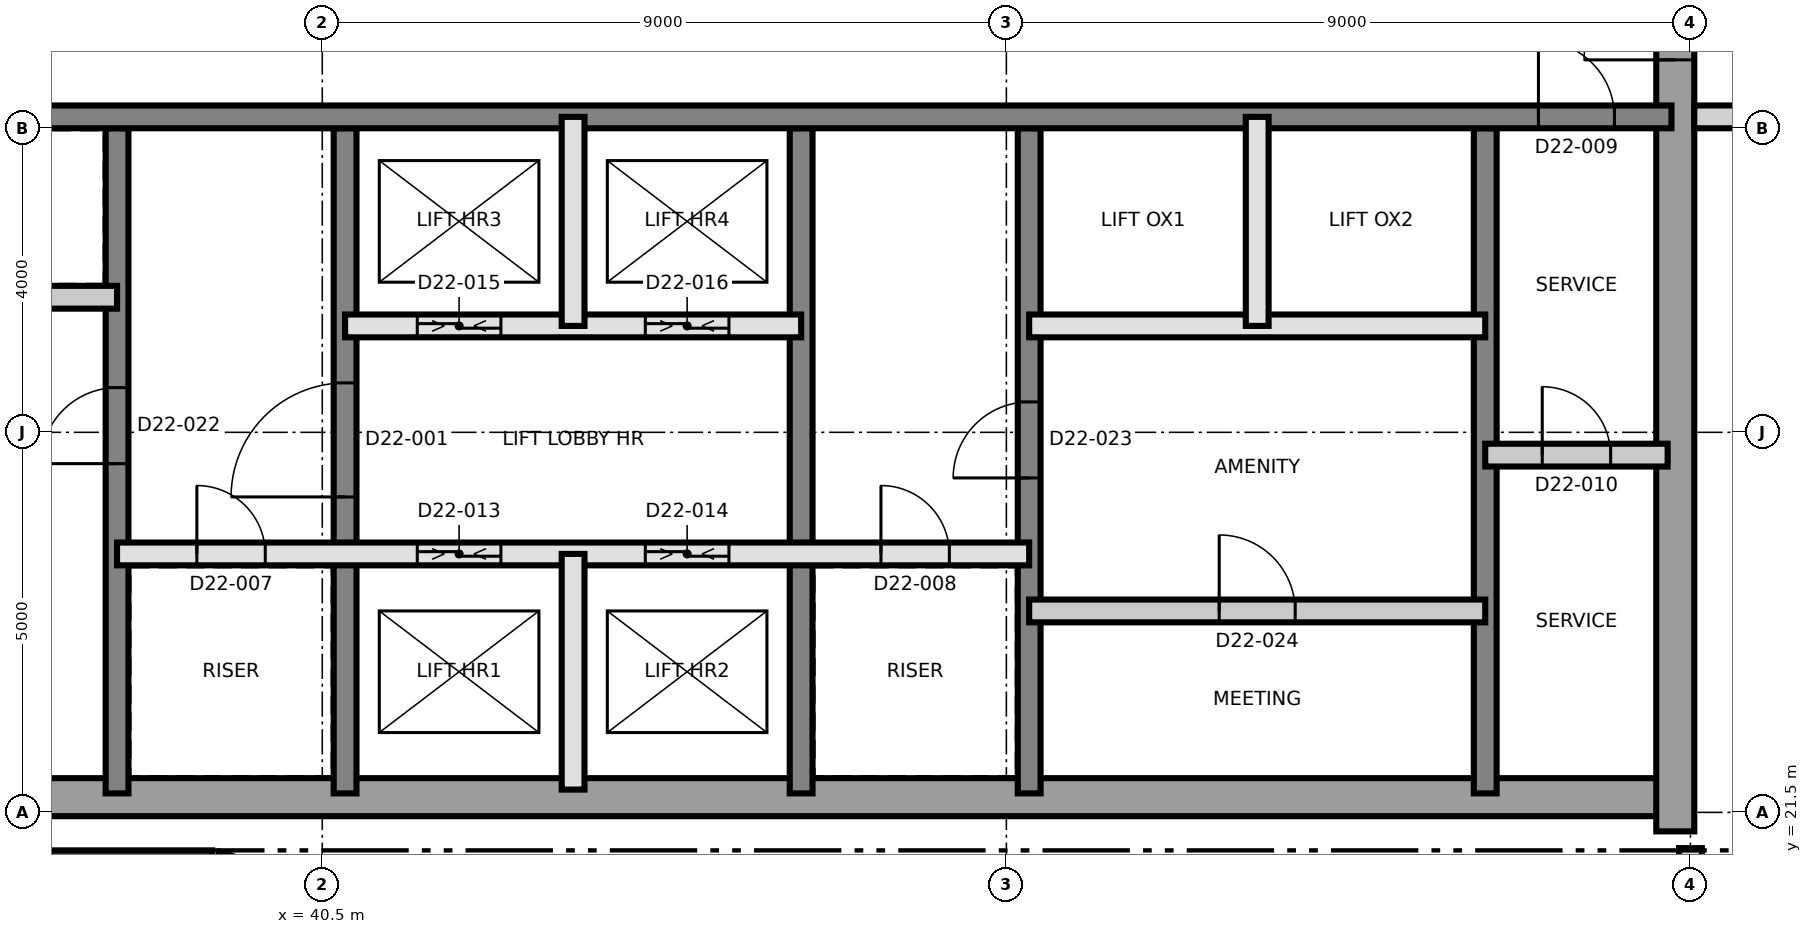
"""IFC4 building model, lengths in metres.
Left out: names, types, materials, properties, quantities, classifications, styles, units other than length and angle.
Written with IfcOpenShell. Run it as: python <this file> out.ifc"""

import sys

from ifc_helpers import new_model, si_unit, direction, frame, frame_2d, origin, place, context, subcontext, project, spatial, rectangle, extrude, element, fill, save


model = new_model("IFC4")
c1 = context("Model", 3, precision=1e-05, world=origin(), true_north=direction((0.0, 1.0)))
c2 = subcontext(c1, "Body", "Model", "MODEL_VIEW")
j1 = project(units=[si_unit("LENGTHUNIT", "METRE"), si_unit("PLANEANGLEUNIT", "RADIAN")], contexts=[c1])
p1 = place(None, origin())
s1 = spatial("IfcSite", under=j1, at=p1, CompositionType="ELEMENT")
p2 = place(p1, origin())
s2 = spatial("IfcBuilding", under=s1, at=p2, CompositionType="ELEMENT")
p3 = place(p2, frame((0.0, 0.0, 203.2)))
s3 = spatial("IfcBuildingStorey", under=s2, at=p3, CompositionType="ELEMENT", Elevation=203.2)
p4 = place(p3, frame((31.25, 21.7, 0.0), z_axis=(0.0, 0.0, 1.0), x_axis=(1.0, 0.0, 0.0)))
e1 = element("IfcWall", 1, at=p4, inside=s3, PredefinedType="SHEAR", context=c2, shape_type="SweptSolid", body=[
    extrude(rectangle(XDim=27.0, YDim=0.5, at=frame_2d((13.5, 0.0))), origin(), (0.0, 0.0, 1.0), 3.7),
])
p5 = place(p3, frame((58.3, 21.25, 0.0), z_axis=(0.0, 0.0, 1.0), x_axis=(0.0, 1.0, 0.0)))
e2 = element("IfcWall", 2, at=p5, inside=s3, PredefinedType="SHEAR", context=c2, shape_type="SweptSolid", body=[
    extrude(rectangle(XDim=18.5, YDim=0.5, at=frame_2d((9.25, 0.0))), origin(), (0.0, 0.0, 1.0), 3.7),
])
p6 = place(p5, frame((10.15, 0.0, 0.0)))
e3 = element("IfcOpeningElement", 3, at=p6, cuts=e2, PredefinedType="OPENING", context=c2, shape_type="SweptSolid", body=[
    extrude(rectangle(XDim=1.2, YDim=2.1, at=frame_2d((0.6, 1.05))), frame((0.0, 0.26, 0.0), z_axis=(0.0, -1.0, 0.0), x_axis=(1.0, 0.0, 0.0)), (0.0, 0.0, 1.0), 0.52),
])
p7 = place(p3, frame((37.8, 21.75, 0.0), z_axis=(0.0, 0.0, 1.0), x_axis=(0.0, 1.0, 0.0)))
e4 = element("IfcWall", 4, at=p7, inside=s3, PredefinedType="SHEAR", context=c2, shape_type="SweptSolid", body=[
    extrude(rectangle(XDim=8.75, YDim=0.3, at=frame_2d((4.375, 0.0))), origin(), (0.0, 0.0, 1.0), 3.7),
])
p8 = place(p7, frame((4.338, 0.0, 0.0)))
e5 = element("IfcOpeningElement", 5, at=p8, cuts=e4, PredefinedType="OPENING", context=c2, shape_type="SweptSolid", body=[
    extrude(rectangle(XDim=1.0, YDim=2.1, at=frame_2d((0.5, 1.05))), frame((0.0, 0.16, 0.0), z_axis=(0.0, -1.0, 0.0), x_axis=(1.0, 0.0, 0.0)), (0.0, 0.0, 1.0), 0.32),
])
p9 = place(p3, frame((40.8, 21.75, 0.0), z_axis=(0.0, 0.0, 1.0), x_axis=(0.0, 1.0, 0.0)))
e6 = element("IfcWall", 6, at=p9, inside=s3, PredefinedType="SHEAR", context=c2, shape_type="SweptSolid", body=[
    extrude(rectangle(XDim=8.75, YDim=0.3, at=frame_2d((4.375, 0.0))), origin(), (0.0, 0.0, 1.0), 3.7),
])
p10 = place(p9, frame((3.9, 0.0, 0.0)))
e7 = element("IfcOpeningElement", 7, at=p10, cuts=e6, PredefinedType="OPENING", context=c2, shape_type="SweptSolid", body=[
    extrude(rectangle(XDim=1.5, YDim=2.1, at=frame_2d((0.75, 1.05))), frame((0.0, 0.16, 0.0), z_axis=(0.0, -1.0, 0.0), x_axis=(1.0, 0.0, 0.0)), (0.0, 0.0, 1.0), 0.32),
])
p11 = place(p3, frame((46.8, 21.75, 0.0), z_axis=(0.0, 0.0, 1.0), x_axis=(0.0, 1.0, 0.0)))
e8 = element("IfcWall", 8, at=p11, inside=s3, PredefinedType="SHEAR", context=c2, shape_type="SweptSolid", body=[
    extrude(rectangle(XDim=8.75, YDim=0.3, at=frame_2d((4.375, 0.0))), origin(), (0.0, 0.0, 1.0), 3.7),
])
p12 = place(p3, frame((49.8, 21.75, 0.0), z_axis=(0.0, 0.0, 1.0), x_axis=(0.0, 1.0, 0.0)))
e9 = element("IfcWall", 9, at=p12, inside=s3, PredefinedType="SHEAR", context=c2, shape_type="SweptSolid", body=[
    extrude(rectangle(XDim=8.75, YDim=0.3, at=frame_2d((4.375, 0.0))), origin(), (0.0, 0.0, 1.0), 3.7),
])
p13 = place(p12, frame((4.15, 0.0, 0.0)))
e10 = element("IfcOpeningElement", 10, at=p13, cuts=e9, PredefinedType="OPENING", context=c2, shape_type="SweptSolid", body=[
    extrude(rectangle(XDim=1.0, YDim=2.1, at=frame_2d((0.5, 1.05))), frame((0.0, 0.16, 0.0), z_axis=(0.0, -1.0, 0.0), x_axis=(1.0, 0.0, 0.0)), (0.0, 0.0, 1.0), 0.32),
])
p14 = place(p3, frame((55.8, 21.75, 0.0), z_axis=(0.0, 0.0, 1.0), x_axis=(0.0, 1.0, 0.0)))
e11 = element("IfcWall", 11, at=p14, inside=s3, PredefinedType="SHEAR", context=c2, shape_type="SweptSolid", body=[
    extrude(rectangle(XDim=8.75, YDim=0.3, at=frame_2d((4.375, 0.0))), origin(), (0.0, 0.0, 1.0), 3.7),
])
p15 = place(p3, frame((31.75, 30.65, 0.0), z_axis=(0.0, 0.0, 1.0), x_axis=(1.0, 0.0, 0.0)))
e12 = element("IfcWall", 12, at=p15, inside=s3, PredefinedType="SHEAR", context=c2, shape_type="SweptSolid", body=[
    extrude(rectangle(XDim=26.5, YDim=0.3, at=frame_2d((13.25, 0.0))), origin(), (0.0, 0.0, 1.0), 3.7),
])
p16 = place(p15, frame((24.75, 0.0, 0.0)))
e13 = element("IfcOpeningElement", 13, at=p16, cuts=e12, PredefinedType="OPENING", context=c2, shape_type="SweptSolid", body=[
    extrude(rectangle(XDim=1.0, YDim=2.1, at=frame_2d((0.5, 1.05))), frame((0.0, 0.16, 0.0), z_axis=(0.0, -1.0, 0.0), x_axis=(1.0, 0.0, 0.0)), (0.0, 0.0, 1.0), 0.32),
])
p17 = place(p15, frame((4.05, 0.0, 0.0)))
e14 = element("IfcOpeningElement", 14, at=p17, cuts=e12, PredefinedType="OPENING", context=c2, shape_type="SweptSolid", body=[
    extrude(rectangle(XDim=1.0, YDim=2.1, at=frame_2d((0.5, 1.05))), frame((0.0, 0.16, 0.0), z_axis=(0.0, -1.0, 0.0), x_axis=(1.0, 0.0, 0.0)), (0.0, 0.0, 1.0), 0.32),
])
p18 = place(p3, frame((31.36, 20.85, 0.0), z_axis=(0.0, 0.0, 1.0), x_axis=(1.0, 0.0, 0.0)))
e15 = element("IfcWall", 15, at=p18, inside=s3, PredefinedType="SOLIDWALL", context=c2, shape_type="SweptSolid", body=[
    extrude(rectangle(XDim=7.693, YDim=0.3, at=frame_2d((3.846, 0.0))), origin(), (0.0, 0.0, 1.0), 3.4),
])
p19 = place(p3, frame((39.101, 20.842, 0.0), z_axis=(0.0, 0.0, 1.0), x_axis=(0.946930456305, -0.32143850255, 0.0)))
e16 = element("IfcWall", 16, at=p19, inside=s3, PredefinedType="SOLIDWALL", context=c2, shape_type="SweptSolid", body=[
    extrude(rectangle(XDim=1.32, YDim=0.3, at=frame_2d((0.66, 0.0))), origin(), (0.0, 0.0, 1.0), 3.4),
])
p20 = place(p3, frame((49.8, 24.15, 0.0), z_axis=(0.0, 0.0, 1.0), x_axis=(1.0, 0.0, 0.0)))
e17 = element("IfcWall", 17, at=p20, inside=s3, PredefinedType="PARTITIONING", context=c2, shape_type="SweptSolid", body=[
    extrude(rectangle(XDim=6.0, YDim=0.3, at=frame_2d((3.0, 0.0))), origin(), (0.0, 0.0, 1.0), 3.4),
])
p21 = place(p20, frame((2.5, 0.0, 0.0)))
e18 = element("IfcOpeningElement", 18, at=p21, cuts=e17, PredefinedType="OPENING", context=c2, shape_type="SweptSolid", body=[
    extrude(rectangle(XDim=1.0, YDim=2.1, at=frame_2d((0.5, 1.05))), frame((0.0, 0.16, 0.0), z_axis=(0.0, -1.0, 0.0), x_axis=(1.0, 0.0, 0.0)), (0.0, 0.0, 1.0), 0.32),
])
p22 = place(p3, frame((37.8, 24.9, 0.0), z_axis=(0.0, 0.0, 1.0), x_axis=(1.0, 0.0, 0.0)))
e19 = element("IfcWall", 19, at=p22, inside=s3, PredefinedType="SOLIDWALL", context=c2, shape_type="SweptSolid", body=[
    extrude(rectangle(XDim=12.0, YDim=0.3, at=frame_2d((6.0, 0.0))), origin(), (0.0, 0.0, 1.0), 3.4),
])
p23 = place(p22, frame((1.05, 0.0, 0.0)))
e20 = element("IfcOpeningElement", 20, at=p23, cuts=e19, PredefinedType="OPENING", context=c2, shape_type="SweptSolid", body=[
    extrude(rectangle(XDim=0.9, YDim=2.1, at=frame_2d((0.45, 1.05))), frame((0.0, 0.16, 0.0), z_axis=(0.0, -1.0, 0.0), x_axis=(1.0, 0.0, 0.0)), (0.0, 0.0, 1.0), 0.32),
])
p24 = place(p22, frame((10.05, 0.0, 0.0)))
e21 = element("IfcOpeningElement", 21, at=p24, cuts=e19, PredefinedType="OPENING", context=c2, shape_type="SweptSolid", body=[
    extrude(rectangle(XDim=0.9, YDim=2.1, at=frame_2d((0.45, 1.05))), frame((0.0, 0.16, 0.0), z_axis=(0.0, -1.0, 0.0), x_axis=(1.0, 0.0, 0.0)), (0.0, 0.0, 1.0), 0.32),
])
p25 = place(p22, frame((3.95, 0.0, 0.0)))
e22 = element("IfcOpeningElement", 22, at=p25, cuts=e19, PredefinedType="OPENING", context=c2, shape_type="SweptSolid", body=[
    extrude(rectangle(XDim=1.1, YDim=2.4, at=frame_2d((0.55, 1.2))), frame((0.0, 0.16, 0.0), z_axis=(0.0, -1.0, 0.0), x_axis=(1.0, 0.0, 0.0)), (0.0, 0.0, 1.0), 0.32),
])
p26 = place(p22, frame((6.95, 0.0, 0.0)))
e23 = element("IfcOpeningElement", 23, at=p26, cuts=e19, PredefinedType="OPENING", context=c2, shape_type="SweptSolid", body=[
    extrude(rectangle(XDim=1.1, YDim=2.4, at=frame_2d((0.55, 1.2))), frame((0.0, 0.16, 0.0), z_axis=(0.0, -1.0, 0.0), x_axis=(1.0, 0.0, 0.0)), (0.0, 0.0, 1.0), 0.32),
])
p27 = place(p3, frame((55.8, 26.2, 0.0), z_axis=(0.0, 0.0, 1.0), x_axis=(1.0, 0.0, 0.0)))
e24 = element("IfcWall", 24, at=p27, inside=s3, PredefinedType="PARTITIONING", context=c2, shape_type="SweptSolid", body=[
    extrude(rectangle(XDim=2.4, YDim=0.3, at=frame_2d((1.2, 0.0))), origin(), (0.0, 0.0, 1.0), 3.4),
])
p28 = place(p27, frame((0.75, 0.0, 0.0)))
e25 = element("IfcOpeningElement", 25, at=p28, cuts=e24, PredefinedType="OPENING", context=c2, shape_type="SweptSolid", body=[
    extrude(rectangle(XDim=0.9, YDim=2.1, at=frame_2d((0.45, 1.05))), frame((0.0, 0.16, 0.0), z_axis=(0.0, -1.0, 0.0), x_axis=(1.0, 0.0, 0.0)), (0.0, 0.0, 1.0), 0.32),
])
p29 = place(p3, frame((40.8, 27.9, 0.0), z_axis=(0.0, 0.0, 1.0), x_axis=(1.0, 0.0, 0.0)))
e26 = element("IfcWall", 26, at=p29, inside=s3, PredefinedType="SOLIDWALL", context=c2, shape_type="SweptSolid", body=[
    extrude(rectangle(XDim=6.0, YDim=0.3, at=frame_2d((3.0, 0.0))), origin(), (0.0, 0.0, 1.0), 3.4),
])
p30 = place(p29, frame((0.95, 0.0, 0.0)))
e27 = element("IfcOpeningElement", 27, at=p30, cuts=e26, PredefinedType="OPENING", context=c2, shape_type="SweptSolid", body=[
    extrude(rectangle(XDim=1.1, YDim=2.4, at=frame_2d((0.55, 1.2))), frame((0.0, 0.16, 0.0), z_axis=(0.0, -1.0, 0.0), x_axis=(1.0, 0.0, 0.0)), (0.0, 0.0, 1.0), 0.32),
])
p31 = place(p29, frame((3.95, 0.0, 0.0)))
e28 = element("IfcOpeningElement", 28, at=p31, cuts=e26, PredefinedType="OPENING", context=c2, shape_type="SweptSolid", body=[
    extrude(rectangle(XDim=1.1, YDim=2.4, at=frame_2d((0.55, 1.2))), frame((0.0, 0.16, 0.0), z_axis=(0.0, -1.0, 0.0), x_axis=(1.0, 0.0, 0.0)), (0.0, 0.0, 1.0), 0.32),
])
p32 = place(p3, frame((49.8, 27.9, 0.0), z_axis=(0.0, 0.0, 1.0), x_axis=(1.0, 0.0, 0.0)))
e29 = element("IfcWall", 29, at=p32, inside=s3, PredefinedType="SOLIDWALL", context=c2, shape_type="SweptSolid", body=[
    extrude(rectangle(XDim=6.0, YDim=0.3, at=frame_2d((3.0, 0.0))), origin(), (0.0, 0.0, 1.0), 3.4),
])
p33 = place(p3, frame((31.8, 28.277, 0.0), z_axis=(0.0, 0.0, 1.0), x_axis=(1.0, 0.0, 0.0)))
e30 = element("IfcWall", 30, at=p33, inside=s3, PredefinedType="PARTITIONING", context=c2, shape_type="SweptSolid", body=[
    extrude(rectangle(XDim=6.0, YDim=0.3, at=frame_2d((3.0, 0.0))), origin(), (0.0, 0.0, 1.0), 3.4),
])
p34 = place(p3, frame((43.8, 21.8, 0.0), z_axis=(0.0, 0.0, 1.0), x_axis=(0.0, 1.0, 0.0)))
e31 = element("IfcWall", 31, at=p34, inside=s3, PredefinedType="SOLIDWALL", context=c2, shape_type="SweptSolid", body=[
    extrude(rectangle(XDim=3.1, YDim=0.3, at=frame_2d((1.55, 0.0))), origin(), (0.0, 0.0, 1.0), 3.4),
])
for number, where, z_axis, x_axis in (
    (32, (43.8, 27.9, 0.0), (0.0, 0.0, 1.0), (0.0, 1.0, 0.0)),
    (33, (52.8, 27.9, 0.0), (0.0, 0.0, 1.0), (0.0, 1.0, 0.0)),
):
    element("IfcWall", number, at=place(p3, frame(where, z_axis=z_axis, x_axis=x_axis)), inside=s3, PredefinedType="SOLIDWALL", context=c2, shape_type="SweptSolid", body=[
        extrude(rectangle(XDim=2.75, YDim=0.3, at=frame_2d((1.375, 0.0))), origin(), (0.0, 0.0, 1.0), 3.4),
    ])
p35 = place(p3, frame((58.55, 30.65, 0.0), z_axis=(0.0, 0.0, 1.0), x_axis=(1.0, 0.0, 0.0)))
e34 = element("IfcWall", 34, at=p35, inside=s3, PredefinedType="PARTITIONING", context=c2, shape_type="SweptSolid", body=[
    extrude(rectangle(XDim=26.78, YDim=0.3, at=frame_2d((13.39, 0.0))), origin(), (0.0, 0.0, 1.0), 3.4),
])
p36 = place(p35, frame((1.65, 0.0, 0.0)))
e35 = element("IfcOpeningElement", 35, at=p36, cuts=e34, PredefinedType="OPENING", context=c2, shape_type="SweptSolid", body=[
    extrude(rectangle(XDim=1.2, YDim=2.1, at=frame_2d((0.6, 1.05))), frame((0.0, 0.16, 0.0), z_axis=(0.0, -1.0, 0.0), x_axis=(1.0, 0.0, 0.0)), (0.0, 0.0, 1.0), 0.32),
])
p37 = place(p35, frame((4.9, 0.0, 0.0)))
e36 = element("IfcOpeningElement", 36, at=p37, cuts=e34, PredefinedType="OPENING", context=c2, shape_type="SweptSolid", body=[
    extrude(rectangle(XDim=1.0, YDim=2.1, at=frame_2d((0.5, 1.05))), frame((0.0, 0.16, 0.0), z_axis=(0.0, -1.0, 0.0), x_axis=(1.0, 0.0, 0.0)), (0.0, 0.0, 1.0), 0.32),
])
p38 = place(p35, frame((10.085, 0.0, 0.0)))
e37 = element("IfcOpeningElement", 37, at=p38, cuts=e34, PredefinedType="OPENING", context=c2, shape_type="SweptSolid", body=[
    extrude(rectangle(XDim=1.2, YDim=2.1, at=frame_2d((0.6, 1.05))), frame((0.0, 0.16, 0.0), z_axis=(0.0, -1.0, 0.0), x_axis=(1.0, 0.0, 0.0)), (0.0, 0.0, 1.0), 0.32),
])
p39 = place(p35, frame((13.335, 0.0, 0.0)))
e38 = element("IfcOpeningElement", 38, at=p39, cuts=e34, PredefinedType="OPENING", context=c2, shape_type="SweptSolid", body=[
    extrude(rectangle(XDim=1.0, YDim=2.1, at=frame_2d((0.5, 1.05))), frame((0.0, 0.16, 0.0), z_axis=(0.0, -1.0, 0.0), x_axis=(1.0, 0.0, 0.0)), (0.0, 0.0, 1.0), 0.32),
])
p40 = place(p35, frame((19.085, 0.0, 0.0)))
e39 = element("IfcOpeningElement", 39, at=p40, cuts=e34, PredefinedType="OPENING", context=c2, shape_type="SweptSolid", body=[
    extrude(rectangle(XDim=1.2, YDim=2.1, at=frame_2d((0.6, 1.05))), frame((0.0, 0.16, 0.0), z_axis=(0.0, -1.0, 0.0), x_axis=(1.0, 0.0, 0.0)), (0.0, 0.0, 1.0), 0.32),
])
p41 = place(p35, frame((22.335, 0.0, 0.0)))
e40 = element("IfcOpeningElement", 40, at=p41, cuts=e34, PredefinedType="OPENING", context=c2, shape_type="SweptSolid", body=[
    extrude(rectangle(XDim=1.0, YDim=2.1, at=frame_2d((0.5, 1.05))), frame((0.0, 0.16, 0.0), z_axis=(0.0, -1.0, 0.0), x_axis=(1.0, 0.0, 0.0)), (0.0, 0.0, 1.0), 0.32),
])
p42 = place(p3, frame((58.5, 20.135, 0.0), z_axis=(0.0, 0.0, 1.0), x_axis=(0.0, 1.0, 0.0)))
e41 = element("IfcWall", 41, at=p42, inside=s3, PredefinedType="PARTITIONING", context=c2, shape_type="SweptSolid", body=[
    extrude(rectangle(XDim=0.895, YDim=0.3, at=frame_2d((0.448, 0.0))), origin(), (0.0, 0.0, 1.0), 3.35),
])
p43 = place(p10, origin())
e42 = element("IfcDoor", 42, at=p43, inside=s3, OperationType="SINGLE_SWING_RIGHT", PredefinedType="DOOR", context=c2, shape_type="SweptSolid", body=[
    extrude(rectangle(XDim=1.5, YDim=2.1, at=frame_2d((0.75, 1.05))), frame((0.0, 0.025, 0.0), z_axis=(0.0, -1.0, 0.0), x_axis=(1.0, 0.0, 0.0)), (0.0, 0.0, 1.0), 0.05),
])
fill(e7, e42)
p44 = place(p23, origin())
e43 = element("IfcDoor", 43, at=p44, inside=s3, OperationType="SINGLE_SWING_LEFT", PredefinedType="DOOR", context=c2, shape_type="SweptSolid", body=[
    extrude(rectangle(XDim=0.9, YDim=2.1, at=frame_2d((0.45, 1.05))), frame((0.0, 0.025, 0.0), z_axis=(0.0, -1.0, 0.0), x_axis=(1.0, 0.0, 0.0)), (0.0, 0.0, 1.0), 0.05),
])
fill(e20, e43)
p45 = place(p24, origin())
e44 = element("IfcDoor", 44, at=p45, inside=s3, OperationType="SINGLE_SWING_RIGHT", PredefinedType="DOOR", context=c2, shape_type="SweptSolid", body=[
    extrude(rectangle(XDim=0.9, YDim=2.1, at=frame_2d((0.45, 1.05))), frame((0.0, 0.025, 0.0), z_axis=(0.0, -1.0, 0.0), x_axis=(1.0, 0.0, 0.0)), (0.0, 0.0, 1.0), 0.05),
])
fill(e21, e44)
p46 = place(p16, origin())
e45 = element("IfcDoor", 45, at=p46, inside=s3, OperationType="SINGLE_SWING_LEFT", PredefinedType="DOOR", context=c2, shape_type="SweptSolid", body=[
    extrude(rectangle(XDim=1.0, YDim=2.1, at=frame_2d((0.5, 1.05))), frame((0.0, 0.025, 0.0), z_axis=(0.0, -1.0, 0.0), x_axis=(1.0, 0.0, 0.0)), (0.0, 0.0, 1.0), 0.05),
])
fill(e13, e45)
p47 = place(p28, origin())
e46 = element("IfcDoor", 46, at=p47, inside=s3, OperationType="SINGLE_SWING_RIGHT", PredefinedType="DOOR", context=c2, shape_type="SweptSolid", body=[
    extrude(rectangle(XDim=0.9, YDim=2.1, at=frame_2d((0.45, 1.05))), frame((0.0, 0.025, 0.0), z_axis=(0.0, -1.0, 0.0), x_axis=(1.0, 0.0, 0.0)), (0.0, 0.0, 1.0), 0.05),
])
fill(e25, e46)
p48 = place(p6, origin())
e47 = element("IfcDoor", 47, at=p48, inside=s3, OperationType="SINGLE_SWING_LEFT", PredefinedType="DOOR", context=c2, shape_type="SweptSolid", body=[
    extrude(rectangle(XDim=1.2, YDim=2.1, at=frame_2d((0.6, 1.05))), frame((0.0, 0.025, 0.0), z_axis=(0.0, -1.0, 0.0), x_axis=(1.0, 0.0, 0.0)), (0.0, 0.0, 1.0), 0.05),
])
fill(e3, e47)
p49 = place(p25, origin())
e48 = element("IfcDoor", 48, at=p49, inside=s3, OperationType="SLIDING_TO_LEFT", PredefinedType="DOOR", context=c2, shape_type="SweptSolid", body=[
    extrude(rectangle(XDim=1.1, YDim=2.4, at=frame_2d((0.55, 1.2))), frame((0.0, 0.025, 0.0), z_axis=(0.0, -1.0, 0.0), x_axis=(1.0, 0.0, 0.0)), (0.0, 0.0, 1.0), 0.05),
])
fill(e22, e48)
p50 = place(p26, origin())
e49 = element("IfcDoor", 49, at=p50, inside=s3, OperationType="SLIDING_TO_LEFT", PredefinedType="DOOR", context=c2, shape_type="SweptSolid", body=[
    extrude(rectangle(XDim=1.1, YDim=2.4, at=frame_2d((0.55, 1.2))), frame((0.0, 0.025, 0.0), z_axis=(0.0, -1.0, 0.0), x_axis=(1.0, 0.0, 0.0)), (0.0, 0.0, 1.0), 0.05),
])
fill(e23, e49)
p51 = place(p30, origin())
e50 = element("IfcDoor", 50, at=p51, inside=s3, OperationType="SLIDING_TO_LEFT", PredefinedType="DOOR", context=c2, shape_type="SweptSolid", body=[
    extrude(rectangle(XDim=1.1, YDim=2.4, at=frame_2d((0.55, 1.2))), frame((0.0, 0.025, 0.0), z_axis=(0.0, -1.0, 0.0), x_axis=(1.0, 0.0, 0.0)), (0.0, 0.0, 1.0), 0.05),
])
fill(e27, e50)
p52 = place(p31, origin())
e51 = element("IfcDoor", 51, at=p52, inside=s3, OperationType="SLIDING_TO_LEFT", PredefinedType="DOOR", context=c2, shape_type="SweptSolid", body=[
    extrude(rectangle(XDim=1.1, YDim=2.4, at=frame_2d((0.55, 1.2))), frame((0.0, 0.025, 0.0), z_axis=(0.0, -1.0, 0.0), x_axis=(1.0, 0.0, 0.0)), (0.0, 0.0, 1.0), 0.05),
])
fill(e28, e51)
p53 = place(p8, origin())
e52 = element("IfcDoor", 52, at=p53, inside=s3, OperationType="SINGLE_SWING_RIGHT", PredefinedType="DOOR", context=c2, shape_type="SweptSolid", body=[
    extrude(rectangle(XDim=1.0, YDim=2.1, at=frame_2d((0.5, 1.05))), frame((0.0, 0.025, 0.0), z_axis=(0.0, -1.0, 0.0), x_axis=(1.0, 0.0, 0.0)), (0.0, 0.0, 1.0), 0.05),
])
fill(e5, e52)
p54 = place(p13, origin())
e53 = element("IfcDoor", 53, at=p54, inside=s3, OperationType="SINGLE_SWING_LEFT", PredefinedType="DOOR", context=c2, shape_type="SweptSolid", body=[
    extrude(rectangle(XDim=1.0, YDim=2.1, at=frame_2d((0.5, 1.05))), frame((0.0, 0.025, 0.0), z_axis=(0.0, -1.0, 0.0), x_axis=(1.0, 0.0, 0.0)), (0.0, 0.0, 1.0), 0.05),
])
fill(e10, e53)
p55 = place(p21, origin())
e54 = element("IfcDoor", 54, at=p55, inside=s3, OperationType="SINGLE_SWING_RIGHT", PredefinedType="DOOR", context=c2, shape_type="SweptSolid", body=[
    extrude(rectangle(XDim=1.0, YDim=2.1, at=frame_2d((0.5, 1.05))), frame((0.0, 0.025, 0.0), z_axis=(0.0, -1.0, 0.0), x_axis=(1.0, 0.0, 0.0)), (0.0, 0.0, 1.0), 0.05),
])
fill(e18, e54)
save(model, sys.argv[1])
